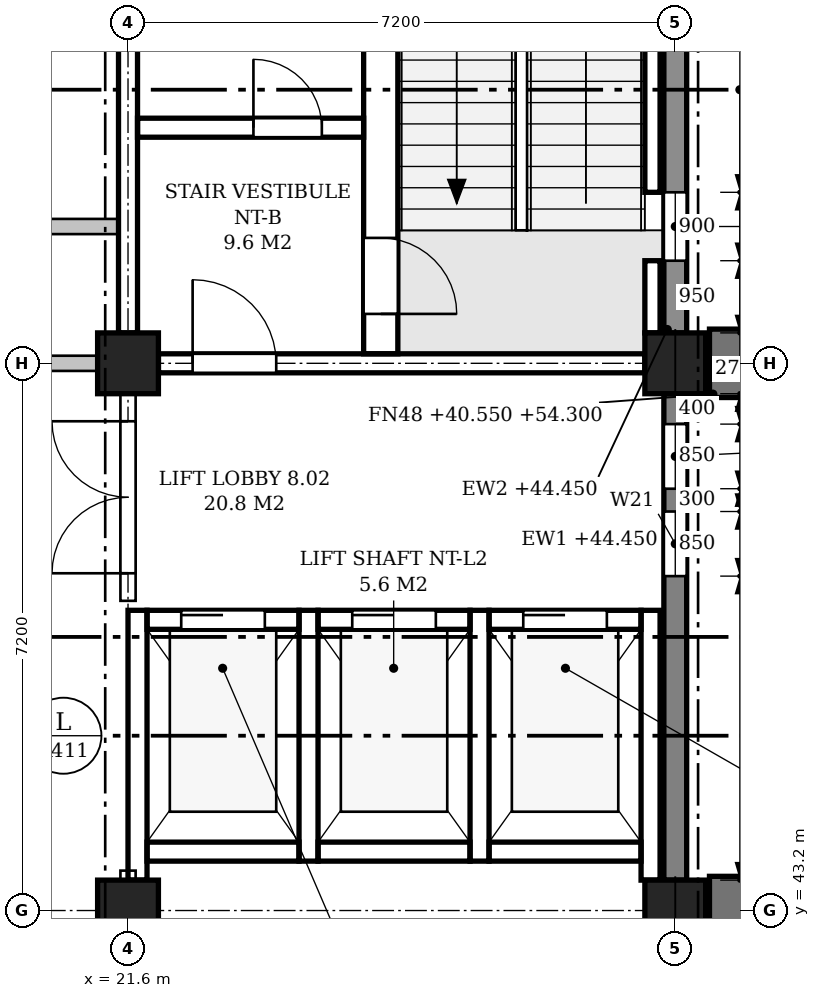
"""IFC4 building model, lengths in metres.
Left out: names, types, materials, properties, quantities, classifications, styles, units other than length and angle.
Written with IfcOpenShell. Run it as: python <this file> out.ifc"""

import sys

from ifc_helpers import new_model, si_unit, direction, frame, frame_2d, origin, origin_2d, place, context, subcontext, project, spatial, polyline, rectangle, outline, extrude, element, fill, save


model = new_model("IFC4")
c1 = context("Model", 3, precision=1e-05, world=origin(), true_north=direction((0.0, 1.0)))
c2 = subcontext(c1, "Body", "Model", "MODEL_VIEW")
j1 = project(units=[si_unit("LENGTHUNIT", "METRE"), si_unit("PLANEANGLEUNIT", "RADIAN")], contexts=[c1])
p1 = place(None, origin())
s1 = spatial("IfcSite", under=j1, at=p1, CompositionType="ELEMENT")
p2 = place(p1, origin())
s2 = spatial("IfcBuilding", under=s1, at=p2, CompositionType="ELEMENT")
p3 = place(p2, frame((0.0, 0.0, 40.8)))
s3 = spatial("IfcBuildingStorey", under=s2, at=p3, CompositionType="ELEMENT", Elevation=40.8)
for number, where, z_axis, x_axis in (
    (1, (21.6, 43.2, 0.0), (0.0, 0.0, 1.0), (1.0, 0.0, 0.0)),
    (2, (21.6, 50.4, 0.0), (0.0, 0.0, 1.0), (1.0, 0.0, 0.0)),
    (3, (28.8, 43.2, 0.0), (0.0, 0.0, 1.0), (1.0, 0.0, 0.0)),
    (4, (28.8, 50.4, 0.0), (0.0, 0.0, 1.0), (1.0, 0.0, 0.0)),
):
    element("IfcColumn", number, at=place(p3, frame(where, z_axis=z_axis, x_axis=x_axis)), inside=s3, PredefinedType="COLUMN", context=c2, shape_type="SweptSolid", body=[
        extrude(rectangle(XDim=0.8, YDim=0.8, at=origin_2d()), origin(), (0.0, 0.0, 1.0), 4.5),
    ])
p4 = place(p3, frame((28.8, 43.6, 0.0), z_axis=(0.0, 0.0, 1.0), x_axis=(0.0, 1.0, 0.0)))
e5 = element("IfcWall", 5, at=p4, inside=s3, PredefinedType="STANDARD", context=c2, shape_type="SweptSolid", body=[
    extrude(rectangle(XDim=6.4, YDim=0.3, at=frame_2d((3.2, 0.0))), origin(), (0.0, 0.0, 1.0), 3.65),
])
p5 = place(p4, frame((4.0, 0.0, 0.9)))
e6 = element("IfcOpeningElement", 6, at=p5, cuts=e5, PredefinedType="OPENING", context=c2, shape_type="SweptSolid", body=[
    extrude(outline(polyline([(0.0, 0.0), (0.85, 0.0), (0.85, 2.25), (0.425, 2.7), (0.0, 2.25), (0.0, 0.0)])), frame((0.0, 0.16, 0.0), z_axis=(0.0, -1.0, 0.0), x_axis=(1.0, 0.0, 0.0)), (0.0, 0.0, 1.0), 0.32),
])
p6 = place(p4, frame((5.15, 0.0, 0.9)))
e7 = element("IfcOpeningElement", 7, at=p6, cuts=e5, PredefinedType="OPENING", context=c2, shape_type="SweptSolid", body=[
    extrude(outline(polyline([(0.0, 0.0), (0.85, 0.0), (0.85, 2.25), (0.425, 2.7), (0.0, 2.25), (0.0, 0.0)])), frame((0.0, 0.16, 0.0), z_axis=(0.0, -1.0, 0.0), x_axis=(1.0, 0.0, 0.0)), (0.0, 0.0, 1.0), 0.32),
])
p7 = place(p3, frame((28.8, 50.8, 0.0), z_axis=(0.0, 0.0, 1.0), x_axis=(0.0, 1.0, 0.0)))
e8 = element("IfcWall", 8, at=p7, inside=s3, PredefinedType="STANDARD", context=c2, shape_type="SweptSolid", body=[
    extrude(rectangle(XDim=6.4, YDim=0.3, at=frame_2d((3.2, 0.0))), origin(), (0.0, 0.0, 1.0), 3.65),
])
p8 = place(p7, frame((0.95, 0.0, 0.9)))
e9 = element("IfcOpeningElement", 9, at=p8, cuts=e8, PredefinedType="OPENING", context=c2, shape_type="SweptSolid", body=[
    extrude(outline(polyline([(0.0, 0.0), (0.9, 0.0), (0.9, 2.25), (0.45, 2.7), (0.0, 2.25), (0.0, 0.0)])), frame((0.0, 0.16, 0.0), z_axis=(0.0, -1.0, 0.0), x_axis=(1.0, 0.0, 0.0)), (0.0, 0.0, 1.0), 0.32),
])
p9 = place(p7, frame((4.55, 0.0, 0.9)))
e10 = element("IfcOpeningElement", 10, at=p9, cuts=e8, PredefinedType="OPENING", context=c2, shape_type="SweptSolid", body=[
    extrude(outline(polyline([(0.0, 0.0), (0.9, 0.0), (0.9, 2.25), (0.45, 2.7), (0.0, 2.25), (0.0, 0.0)])), frame((0.0, 0.16, 0.0), z_axis=(0.0, -1.0, 0.0), x_axis=(1.0, 0.0, 0.0)), (0.0, 0.0, 1.0), 0.32),
])
for number, where, z_axis, x_axis in (
    (11, (29.25, 43.2, -0.25), (0.0, 0.0, 1.0), (1.0, 0.0, 0.0)),
    (12, (29.25, 50.4, -0.25), (0.0, 0.0, 1.0), (1.0, 0.0, 0.0)),
):
    element("IfcWall", number, at=place(p3, frame(where, z_axis=z_axis, x_axis=x_axis)), inside=s3, PredefinedType="POLYGONAL", context=c2, shape_type="SweptSolid", body=[
        extrude(outline(polyline([(1.1, 0.0), (1.1, 12.325), (0.15, 13.75), (0.0, 13.75), (0.0, 0.0), (1.1, 0.0)])), frame((0.0, 0.45, 0.0), z_axis=(0.0, -1.0, 0.0), x_axis=(1.0, 0.0, 0.0)), (0.0, 0.0, 1.0), 0.9),
    ])
p10 = place(p3, frame((22.0, 50.4, 0.0), z_axis=(0.0, 0.0, 1.0), x_axis=(1.0, 0.0, 0.0)))
e13 = element("IfcWall", 13, at=p10, inside=s3, PredefinedType="SHEAR", context=c2, shape_type="SweptSolid", body=[
    extrude(rectangle(XDim=6.4, YDim=0.25, at=frame_2d((3.2, 0.0))), origin(), (0.0, 0.0, 1.0), 3.55),
])
p11 = place(p10, frame((0.45, 0.0, 0.0)))
e14 = element("IfcOpeningElement", 14, at=p11, cuts=e13, PredefinedType="OPENING", context=c2, shape_type="SweptSolid", body=[
    extrude(rectangle(XDim=1.1, YDim=2.1, at=frame_2d((0.55, 1.05))), frame((0.0, 0.135, 0.0), z_axis=(0.0, -1.0, 0.0), x_axis=(1.0, 0.0, 0.0)), (0.0, 0.0, 1.0), 0.27),
])
p12 = place(p3, frame((21.6, 50.8, 0.0), z_axis=(0.0, 0.0, 1.0), x_axis=(0.0, 1.0, 0.0)))
e15 = element("IfcWall", 15, at=p12, inside=s3, PredefinedType="SHEAR", context=c2, shape_type="SweptSolid", body=[
    extrude(rectangle(XDim=6.4, YDim=0.25, at=frame_2d((3.2, 0.0))), origin(), (0.0, 0.0, 1.0), 3.55),
])
p13 = place(p3, frame((28.5, 50.8, -0.25), z_axis=(0.0, 0.0, 1.0), x_axis=(0.0, 1.0, 0.0)))
e16 = element("IfcWall", 16, at=p13, inside=s3, PredefinedType="SHEAR", context=c2, shape_type="SweptSolid", body=[
    extrude(rectangle(XDim=0.95, YDim=0.2, at=frame_2d((0.475, 0.0))), origin(), (0.0, 0.0, 1.0), 4.5),
])
p14 = place(p3, frame((28.5, 52.65, -0.25), z_axis=(0.0, 0.0, 1.0), x_axis=(0.0, 1.0, 0.0)))
e17 = element("IfcWall", 17, at=p14, inside=s3, PredefinedType="SHEAR", context=c2, shape_type="SweptSolid", body=[
    extrude(rectangle(XDim=2.7, YDim=0.2, at=frame_2d((1.35, 0.0))), origin(), (0.0, 0.0, 1.0), 4.5),
])
p15 = place(p3, frame((24.925, 50.525, 0.0), z_axis=(0.0, 0.0, 1.0), x_axis=(0.0, 1.0, 0.0)))
e18 = element("IfcWall", 18, at=p15, inside=s3, PredefinedType="SHEAR", context=c2, shape_type="SweptSolid", body=[
    extrude(rectangle(XDim=6.925, YDim=0.45, at=frame_2d((3.462, 0.0))), origin(), (0.0, 0.0, 1.0), 4.25),
])
p16 = place(p15, frame((0.525, 0.0, 0.0)))
e19 = element("IfcOpeningElement", 19, at=p16, cuts=e18, PredefinedType="OPENING", context=c2, shape_type="SweptSolid", body=[
    extrude(rectangle(XDim=1.0, YDim=2.1, at=frame_2d((0.5, 1.05))), frame((0.0, 0.235, 0.0), z_axis=(0.0, -1.0, 0.0), x_axis=(1.0, 0.0, 0.0)), (0.0, 0.0, 1.0), 0.47),
])
p17 = place(p3, frame((21.725, 53.5, 0.0), z_axis=(0.0, 0.0, 1.0), x_axis=(1.0, 0.0, 0.0)))
e20 = element("IfcWall", 20, at=p17, inside=s3, PredefinedType="SHEAR", context=c2, shape_type="SweptSolid", body=[
    extrude(rectangle(XDim=2.975, YDim=0.25, at=frame_2d((1.487, 0.0))), origin(), (0.0, 0.0, 1.0), 4.25),
])
p18 = place(p17, frame((1.525, 0.0, 0.0)))
e21 = element("IfcOpeningElement", 21, at=p18, cuts=e20, PredefinedType="OPENING", context=c2, shape_type="SweptSolid", body=[
    extrude(rectangle(XDim=0.9, YDim=2.1, at=frame_2d((0.45, 1.05))), frame((0.0, 0.135, 0.0), z_axis=(0.0, -1.0, 0.0), x_axis=(1.0, 0.0, 0.0)), (0.0, 0.0, 1.0), 0.27),
])
p19 = place(p3, frame((21.725, 43.6, -0.25), z_axis=(0.0, 0.0, 1.0), x_axis=(0.0, 1.0, 0.0)))
e22 = element("IfcWall", 22, at=p19, inside=s3, PredefinedType="SHEAR", context=c2, shape_type="SweptSolid", body=[
    extrude(rectangle(XDim=3.55, YDim=0.25, at=frame_2d((1.775, 0.0))), origin(), (0.0, 0.0, 1.0), 3.8),
])
for number, where, z_axis, x_axis in (
    (23, (23.975, 43.85, -0.25), (0.0, 0.0, 1.0), (0.0, 1.0, 0.0)),
    (24, (26.225, 43.85, -0.25), (0.0, 0.0, 1.0), (0.0, 1.0, 0.0)),
):
    element("IfcWall", number, at=place(p3, frame(where, z_axis=z_axis, x_axis=x_axis)), inside=s3, PredefinedType="SHEAR", context=c2, shape_type="SweptSolid", body=[
        extrude(rectangle(XDim=3.3, YDim=0.25, at=frame_2d((1.65, 0.0))), origin(), (0.0, 0.0, 1.0), 4.5),
    ])
p20 = place(p3, frame((28.475, 43.6, -0.25), z_axis=(0.0, 0.0, 1.0), x_axis=(0.0, 1.0, 0.0)))
e25 = element("IfcWall", 25, at=p20, inside=s3, PredefinedType="SHEAR", context=c2, shape_type="SweptSolid", body=[
    extrude(rectangle(XDim=3.55, YDim=0.25, at=frame_2d((1.775, 0.0))), origin(), (0.0, 0.0, 1.0), 4.5),
])
p21 = place(p3, frame((21.85, 47.025, -0.25), z_axis=(0.0, 0.0, 1.0), x_axis=(1.0, 0.0, 0.0)))
e26 = element("IfcWall", 26, at=p21, inside=s3, PredefinedType="SHEAR", context=c2, shape_type="SweptSolid", body=[
    extrude(rectangle(XDim=2.0, YDim=0.25, at=frame_2d((1.0, 0.0))), origin(), (0.0, 0.0, 1.0), 4.5),
])
p22 = place(p21, frame((0.45, 0.0, 0.25)))
e27 = element("IfcOpeningElement", 27, at=p22, cuts=e26, PredefinedType="OPENING", context=c2, shape_type="SweptSolid", body=[
    extrude(rectangle(XDim=1.1, YDim=2.1, at=frame_2d((0.55, 1.05))), frame((0.0, 0.135, 0.0), z_axis=(0.0, -1.0, 0.0), x_axis=(1.0, 0.0, 0.0)), (0.0, 0.0, 1.0), 0.27),
])
p23 = place(p3, frame((21.85, 43.975, -0.25), z_axis=(0.0, 0.0, 1.0), x_axis=(1.0, 0.0, 0.0)))
e28 = element("IfcWall", 28, at=p23, inside=s3, PredefinedType="SHEAR", context=c2, shape_type="SweptSolid", body=[
    extrude(rectangle(XDim=2.0, YDim=0.25, at=frame_2d((1.0, 0.0))), origin(), (0.0, 0.0, 1.0), 4.5),
])
p24 = place(p3, frame((24.1, 47.025, -0.25), z_axis=(0.0, 0.0, 1.0), x_axis=(1.0, 0.0, 0.0)))
e29 = element("IfcWall", 29, at=p24, inside=s3, PredefinedType="SHEAR", context=c2, shape_type="SweptSolid", body=[
    extrude(rectangle(XDim=2.0, YDim=0.25, at=frame_2d((1.0, 0.0))), origin(), (0.0, 0.0, 1.0), 4.5),
])
p25 = place(p24, frame((0.45, 0.0, 0.25)))
e30 = element("IfcOpeningElement", 30, at=p25, cuts=e29, PredefinedType="OPENING", context=c2, shape_type="SweptSolid", body=[
    extrude(rectangle(XDim=1.1, YDim=2.1, at=frame_2d((0.55, 1.05))), frame((0.0, 0.135, 0.0), z_axis=(0.0, -1.0, 0.0), x_axis=(1.0, 0.0, 0.0)), (0.0, 0.0, 1.0), 0.27),
])
p26 = place(p3, frame((24.1, 43.975, -0.25), z_axis=(0.0, 0.0, 1.0), x_axis=(1.0, 0.0, 0.0)))
e31 = element("IfcWall", 31, at=p26, inside=s3, PredefinedType="SHEAR", context=c2, shape_type="SweptSolid", body=[
    extrude(rectangle(XDim=2.0, YDim=0.25, at=frame_2d((1.0, 0.0))), origin(), (0.0, 0.0, 1.0), 4.5),
])
p27 = place(p3, frame((26.35, 47.025, -0.25), z_axis=(0.0, 0.0, 1.0), x_axis=(1.0, 0.0, 0.0)))
e32 = element("IfcWall", 32, at=p27, inside=s3, PredefinedType="SHEAR", context=c2, shape_type="SweptSolid", body=[
    extrude(rectangle(XDim=2.0, YDim=0.25, at=frame_2d((1.0, 0.0))), origin(), (0.0, 0.0, 1.0), 4.5),
])
p28 = place(p27, frame((0.45, 0.0, 0.25)))
e33 = element("IfcOpeningElement", 33, at=p28, cuts=e32, PredefinedType="OPENING", context=c2, shape_type="SweptSolid", body=[
    extrude(rectangle(XDim=1.1, YDim=2.1, at=frame_2d((0.55, 1.05))), frame((0.0, 0.135, 0.0), z_axis=(0.0, -1.0, 0.0), x_axis=(1.0, 0.0, 0.0)), (0.0, 0.0, 1.0), 0.27),
])
p29 = place(p3, frame((26.35, 43.975, -0.25), z_axis=(0.0, 0.0, 1.0), x_axis=(1.0, 0.0, 0.0)))
e34 = element("IfcWall", 34, at=p29, inside=s3, PredefinedType="SHEAR", context=c2, shape_type="SweptSolid", body=[
    extrude(rectangle(XDim=2.0, YDim=0.25, at=frame_2d((1.0, 0.0))), origin(), (0.0, 0.0, 1.0), 4.5),
])
p30 = place(p3, frame((14.8, 50.4, 0.0), z_axis=(0.0, 0.0, 1.0), x_axis=(1.0, 0.0, 0.0)))
e35 = element("IfcWall", 35, at=p30, inside=s3, PredefinedType="PARTITIONING", context=c2, shape_type="SweptSolid", body=[
    extrude(rectangle(XDim=6.4, YDim=0.2, at=frame_2d((3.2, 0.0))), origin(), (0.0, 0.0, 1.0), 3.55),
])
p31 = place(p30, frame((4.3, 0.0, 0.0)))
e36 = element("IfcOpeningElement", 36, at=p31, cuts=e35, PredefinedType="OPENING", context=c2, shape_type="SweptSolid", body=[
    extrude(rectangle(XDim=1.0, YDim=2.1, at=frame_2d((0.5, 1.05))), frame((0.0, 0.11, 0.0), z_axis=(0.0, -1.0, 0.0), x_axis=(1.0, 0.0, 0.0)), (0.0, 0.0, 1.0), 0.22),
])
p32 = place(p3, frame((7.325, 52.2, 0.0), z_axis=(0.0, 0.0, 1.0), x_axis=(1.0, 0.0, 0.0)))
e37 = element("IfcWall", 37, at=p32, inside=s3, PredefinedType="PARTITIONING", context=c2, shape_type="SweptSolid", body=[
    extrude(outline(polyline([(0.0, 0.0), (14.15, 0.0), (14.15, 3.55), (14.05, 3.55), (14.05, 4.25), (7.3, 4.25), (7.3, 3.55), (6.85, 3.55), (6.85, 4.25), (0.1, 4.25), (0.1, 3.55), (0.0, 3.55), (0.0, 0.0)])), frame((0.0, 0.1, 0.0), z_axis=(0.0, -1.0, 0.0), x_axis=(1.0, 0.0, 0.0)), (0.0, 0.0, 1.0), 0.2),
])
p33 = place(p32, frame((1.238, 0.0, 0.0)))
e38 = element("IfcOpeningElement", 38, at=p33, cuts=e37, PredefinedType="OPENING", context=c2, shape_type="SweptSolid", body=[
    extrude(rectangle(XDim=1.0, YDim=2.1, at=frame_2d((0.5, 1.05))), frame((0.0, 0.11, 0.0), z_axis=(0.0, -1.0, 0.0), x_axis=(1.0, 0.0, 0.0)), (0.0, 0.0, 1.0), 0.22),
])
p34 = place(p32, frame((4.775, 0.0, 0.0)))
e39 = element("IfcOpeningElement", 39, at=p34, cuts=e37, PredefinedType="OPENING", context=c2, shape_type="SweptSolid", body=[
    extrude(rectangle(XDim=1.0, YDim=2.1, at=frame_2d((0.5, 1.05))), frame((0.0, 0.11, 0.0), z_axis=(0.0, -1.0, 0.0), x_axis=(1.0, 0.0, 0.0)), (0.0, 0.0, 1.0), 0.22),
])
p35 = place(p32, frame((8.375, 0.0, 0.0)))
e40 = element("IfcOpeningElement", 40, at=p35, cuts=e37, PredefinedType="OPENING", context=c2, shape_type="SweptSolid", body=[
    extrude(rectangle(XDim=1.0, YDim=2.1, at=frame_2d((0.5, 1.05))), frame((0.0, 0.11, 0.0), z_axis=(0.0, -1.0, 0.0), x_axis=(1.0, 0.0, 0.0)), (0.0, 0.0, 1.0), 0.22),
])
p36 = place(p32, frame((11.913, 0.0, 0.0)))
e41 = element("IfcOpeningElement", 41, at=p36, cuts=e37, PredefinedType="OPENING", context=c2, shape_type="SweptSolid", body=[
    extrude(rectangle(XDim=1.0, YDim=2.1, at=frame_2d((0.5, 1.05))), frame((0.0, 0.11, 0.0), z_axis=(0.0, -1.0, 0.0), x_axis=(1.0, 0.0, 0.0)), (0.0, 0.0, 1.0), 0.22),
])
p37 = place(p3, frame((21.6, 43.6, 0.0), z_axis=(0.0, 0.0, 1.0), x_axis=(0.0, 1.0, 0.0)))
e42 = element("IfcWall", 42, at=p37, inside=s3, PredefinedType="PARTITIONING", context=c2, shape_type="SweptSolid", body=[
    extrude(rectangle(XDim=0.125, YDim=0.2, at=frame_2d((0.062, 0.0))), origin(), (0.0, 0.0, 1.0), 3.55),
])
p38 = place(p3, frame((21.6, 47.275, 0.0), z_axis=(0.0, 0.0, 1.0), x_axis=(0.0, 1.0, 0.0)))
e43 = element("IfcWall", 43, at=p38, inside=s3, PredefinedType="PARTITIONING", context=c2, shape_type="SweptSolid", body=[
    extrude(rectangle(XDim=2.725, YDim=0.2, at=frame_2d((1.363, 0.0))), origin(), (0.0, 0.0, 1.0), 3.55),
])
p39 = place(p38, frame((0.363, 0.0, 0.0)))
e44 = element("IfcOpeningElement", 44, at=p39, cuts=e43, PredefinedType="OPENING", context=c2, shape_type="SweptSolid", body=[
    extrude(rectangle(XDim=2.0, YDim=2.4, at=frame_2d((1.0, 1.2))), frame((0.0, 0.11, 0.0), z_axis=(0.0, -1.0, 0.0), x_axis=(1.0, 0.0, 0.0)), (0.0, 0.0, 1.0), 0.22),
])
p40 = place(p5, origin())
e45 = element("IfcWindow", 45, at=p40, inside=s3, PartitioningType="SINGLE_PANEL", PredefinedType="WINDOW", context=c2, shape_type="SweptSolid", body=[
    extrude(outline(polyline([(0.0, 0.0), (0.85, 0.0), (0.85, 2.25), (0.425, 2.7), (0.0, 2.25), (0.0, 0.0)])), frame((0.0, 0.03, 0.0), z_axis=(0.0, -1.0, 0.0), x_axis=(1.0, 0.0, 0.0)), (0.0, 0.0, 1.0), 0.06),
])
fill(e6, e45)
p41 = place(p6, origin())
e46 = element("IfcWindow", 46, at=p41, inside=s3, PartitioningType="SINGLE_PANEL", PredefinedType="WINDOW", context=c2, shape_type="SweptSolid", body=[
    extrude(outline(polyline([(0.0, 0.0), (0.85, 0.0), (0.85, 2.25), (0.425, 2.7), (0.0, 2.25), (0.0, 0.0)])), frame((0.0, 0.03, 0.0), z_axis=(0.0, -1.0, 0.0), x_axis=(1.0, 0.0, 0.0)), (0.0, 0.0, 1.0), 0.06),
])
fill(e7, e46)
p42 = place(p8, origin())
e47 = element("IfcWindow", 47, at=p42, inside=s3, PartitioningType="SINGLE_PANEL", PredefinedType="WINDOW", context=c2, shape_type="SweptSolid", body=[
    extrude(outline(polyline([(0.0, 0.0), (0.9, 0.0), (0.9, 2.25), (0.45, 2.7), (0.0, 2.25), (0.0, 0.0)])), frame((0.0, 0.03, 0.0), z_axis=(0.0, -1.0, 0.0), x_axis=(1.0, 0.0, 0.0)), (0.0, 0.0, 1.0), 0.06),
])
fill(e9, e47)
p43 = place(p16, frame((1.0, 0.0, 0.0), z_axis=(0.0, 0.0, 1.0), x_axis=(-1.0, 0.0, 0.0)))
e48 = element("IfcDoor", 48, at=p43, inside=s3, OperationType="SINGLE_SWING_RIGHT", PredefinedType="DOOR", context=c2, shape_type="SweptSolid", body=[
    extrude(rectangle(XDim=1.0, YDim=2.1, at=frame_2d((0.5, 1.05))), frame((0.0, 0.025, 0.0), z_axis=(0.0, -1.0, 0.0), x_axis=(1.0, 0.0, 0.0)), (0.0, 0.0, 1.0), 0.05),
])
fill(e19, e48)
p44 = place(p11, origin())
e49 = element("IfcDoor", 49, at=p44, inside=s3, OperationType="SINGLE_SWING_LEFT", PredefinedType="DOOR", context=c2, shape_type="SweptSolid", body=[
    extrude(rectangle(XDim=1.1, YDim=2.1, at=frame_2d((0.55, 1.05))), frame((0.0, 0.025, 0.0), z_axis=(0.0, -1.0, 0.0), x_axis=(1.0, 0.0, 0.0)), (0.0, 0.0, 1.0), 0.05),
])
fill(e14, e49)
p45 = place(p18, origin())
e50 = element("IfcDoor", 50, at=p45, inside=s3, OperationType="SINGLE_SWING_LEFT", PredefinedType="DOOR", context=c2, shape_type="SweptSolid", body=[
    extrude(rectangle(XDim=0.9, YDim=2.1, at=frame_2d((0.45, 1.05))), frame((0.0, 0.025, 0.0), z_axis=(0.0, -1.0, 0.0), x_axis=(1.0, 0.0, 0.0)), (0.0, 0.0, 1.0), 0.05),
])
fill(e21, e50)
p46 = place(p22, origin())
e51 = element("IfcDoor", 51, at=p46, inside=s3, OperationType="SLIDING_TO_LEFT", PredefinedType="DOOR", context=c2, shape_type="SweptSolid", body=[
    extrude(rectangle(XDim=1.1, YDim=2.1, at=frame_2d((0.55, 1.05))), frame((0.0, 0.025, 0.0), z_axis=(0.0, -1.0, 0.0), x_axis=(1.0, 0.0, 0.0)), (0.0, 0.0, 1.0), 0.05),
])
fill(e27, e51)
p47 = place(p25, origin())
e52 = element("IfcDoor", 52, at=p47, inside=s3, OperationType="SLIDING_TO_LEFT", PredefinedType="DOOR", context=c2, shape_type="SweptSolid", body=[
    extrude(rectangle(XDim=1.1, YDim=2.1, at=frame_2d((0.55, 1.05))), frame((0.0, 0.025, 0.0), z_axis=(0.0, -1.0, 0.0), x_axis=(1.0, 0.0, 0.0)), (0.0, 0.0, 1.0), 0.05),
])
fill(e30, e52)
p48 = place(p28, origin())
e53 = element("IfcDoor", 53, at=p48, inside=s3, OperationType="SLIDING_TO_LEFT", PredefinedType="DOOR", context=c2, shape_type="SweptSolid", body=[
    extrude(rectangle(XDim=1.1, YDim=2.1, at=frame_2d((0.55, 1.05))), frame((0.0, 0.025, 0.0), z_axis=(0.0, -1.0, 0.0), x_axis=(1.0, 0.0, 0.0)), (0.0, 0.0, 1.0), 0.05),
])
fill(e33, e53)
p49 = place(p39, origin())
e54 = element("IfcDoor", 54, at=p49, inside=s3, OperationType="DOUBLE_DOOR_SINGLE_SWING", PredefinedType="DOOR", context=c2, shape_type="SweptSolid", body=[
    extrude(rectangle(XDim=2.0, YDim=2.4, at=frame_2d((1.0, 1.2))), frame((0.0, 0.025, 0.0), z_axis=(0.0, -1.0, 0.0), x_axis=(1.0, 0.0, 0.0)), (0.0, 0.0, 1.0), 0.05),
])
fill(e44, e54)
save(model, sys.argv[1])
